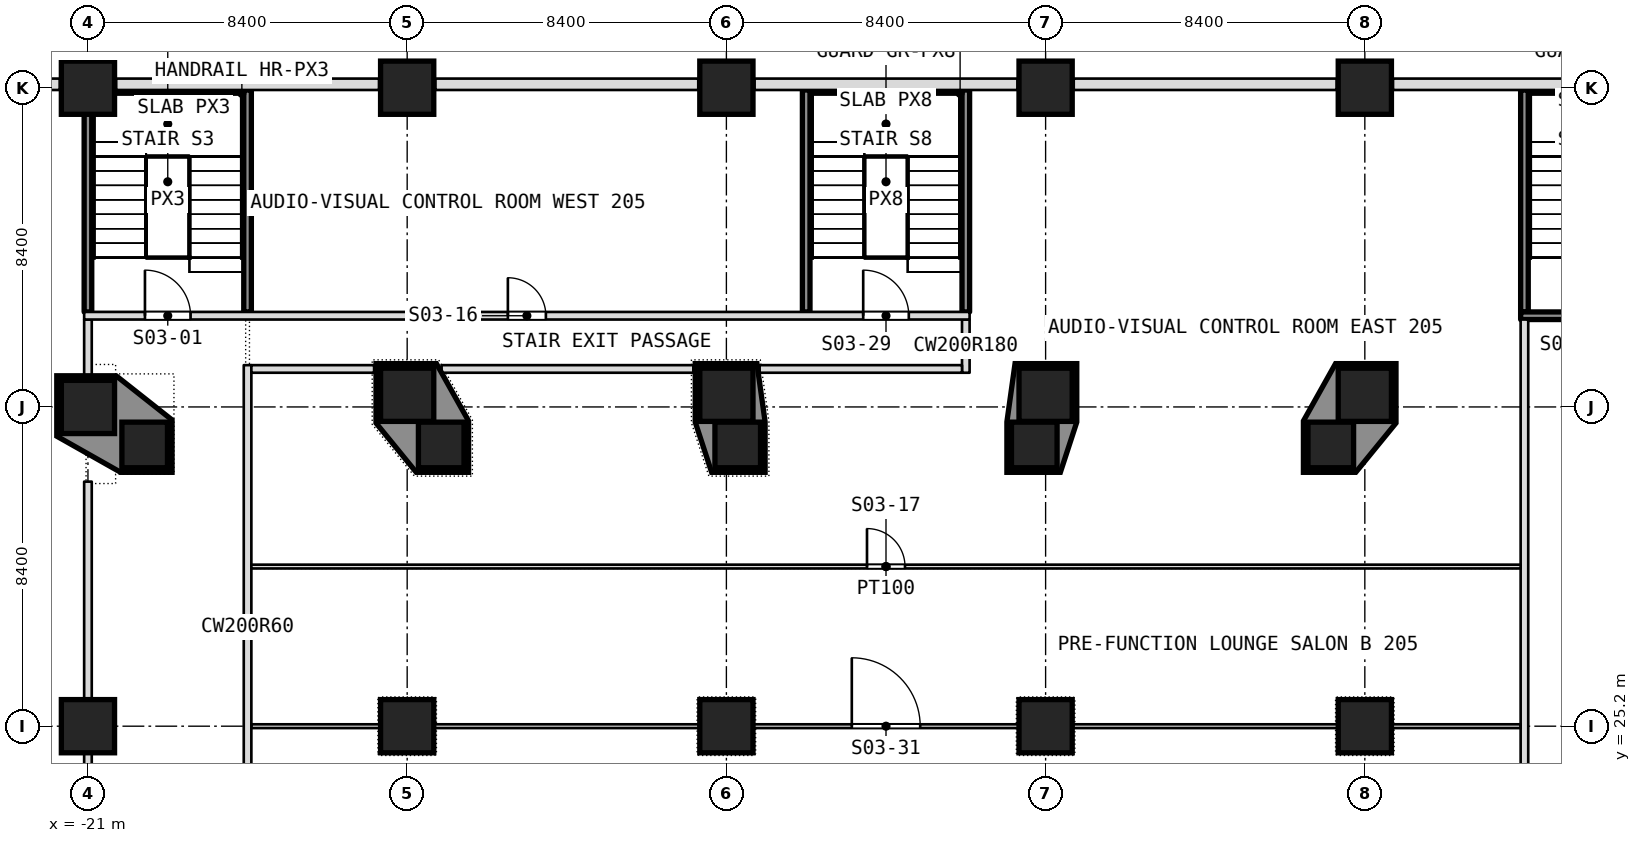
"""IFC4 building model, lengths in metres.
Left out: names, types, materials, properties, quantities, classifications, styles, units other than length and angle.
Written with IfcOpenShell. Run it as: python <this file> out.ifc"""

import sys

from ifc_helpers import new_model, si_unit, direction, frame, frame_2d, origin, origin_2d, place, context, subcontext, project, spatial, polyline, rectangle, outline, extrude, element, fill, save


model = new_model("IFC4")
c1 = context("Model", 3, precision=1e-05, world=origin(), true_north=direction((0.0, 1.0)))
c2 = subcontext(c1, "Body", "Model", "MODEL_VIEW")
j1 = project(units=[si_unit("LENGTHUNIT", "METRE"), si_unit("PLANEANGLEUNIT", "RADIAN")], contexts=[c1])
p1 = place(None, origin())
s1 = spatial("IfcSite", under=j1, at=p1, CompositionType="ELEMENT")
p2 = place(p1, origin())
s2 = spatial("IfcBuilding", under=s1, at=p2, CompositionType="ELEMENT")
p3 = place(p2, frame((0.0, 0.0, 13.0)))
s3 = spatial("IfcBuildingStorey", under=s2, at=p3, CompositionType="ELEMENT", Elevation=13.0)
for number, where, z_axis, x_axis in (
    (1, (-21.0, 25.2, 0.0), (0.0, 0.0, 1.0), (1.0, 0.0, 0.0)),
    (2, (-12.6, 25.2, 0.0), (0.0, 0.0, 1.0), (1.0, 0.0, 0.0)),
    (3, (-4.2, 25.2, 0.0), (0.0, 0.0, 1.0), (1.0, 0.0, 0.0)),
    (4, (4.2, 25.2, 0.0), (0.0, 0.0, 1.0), (1.0, 0.0, 0.0)),
    (5, (12.6, 25.2, 0.0), (0.0, 0.0, 1.0), (1.0, 0.0, 0.0)),
    (6, (-21.0, 33.6, 0.0), (0.0, 0.0, 1.0), (1.0, 0.0, 0.0)),
    (7, (-12.6, 33.92, 0.0), (0.0, 0.0, 1.0), (1.0, 0.0, 0.0)),
    (8, (-4.2, 33.92, 0.0), (0.0, 0.0, 1.0), (1.0, 0.0, 0.0)),
    (9, (4.2, 33.92, 0.0), (0.0, 0.0, 1.0), (1.0, 0.0, 0.0)),
    (10, (12.6, 33.92, 0.0), (0.0, 0.0, 1.0), (1.0, 0.0, 0.0)),
    (11, (-21.0, 42.0, 0.0), (0.0, 0.0, 1.0), (1.0, 0.0, 0.0)),
    (12, (-12.6, 42.0, 0.0), (0.0, 0.0, 1.0), (1.0, 0.0, 0.0)),
    (13, (-4.2, 42.0, 0.0), (0.0, 0.0, 1.0), (1.0, 0.0, 0.0)),
    (14, (4.2, 42.0, 0.0), (0.0, 0.0, 1.0), (1.0, 0.0, 0.0)),
    (15, (12.6, 42.0, 0.0), (0.0, 0.0, 1.0), (1.0, 0.0, 0.0)),
):
    element("IfcColumn", number, at=place(p3, frame(where, z_axis=z_axis, x_axis=x_axis)), inside=s3, PredefinedType="COLUMN", context=c2, shape_type="SweptSolid", body=[
        extrude(rectangle(XDim=1.4, YDim=1.4, at=origin_2d()), origin(), (0.0, 0.0, 1.0), 8.0),
    ])
for number, where, z_axis, x_axis in (
    (16, (-19.507, 32.6, 0.0), (0.0, 0.0, 1.0), (1.0, 0.0, 0.0)),
    (17, (-11.704, 32.6, 0.0), (0.0, 0.0, 1.0), (1.0, 0.0, 0.0)),
    (18, (-3.901, 32.6, 0.0), (0.0, 0.0, 1.0), (1.0, 0.0, 0.0)),
    (19, (3.901, 32.6, 0.0), (0.0, 0.0, 1.0), (1.0, 0.0, 0.0)),
    (20, (11.704, 32.6, 0.0), (0.0, 0.0, 1.0), (1.0, 0.0, 0.0)),
):
    element("IfcColumn", number, at=place(p3, frame(where, z_axis=z_axis, x_axis=x_axis)), inside=s3, PredefinedType="COLUMN", context=c2, shape_type="SweptSolid", body=[
        extrude(rectangle(XDim=1.2, YDim=1.2, at=origin_2d()), origin(), (0.0, 0.0, 1.0), 8.0),
    ])
p4 = place(p3, frame((16.8, 20.9, 0.0), z_axis=(0.0, 0.0, 1.0), x_axis=(0.0, 1.0, 0.0)))
e21 = element("IfcWall", 21, at=p4, inside=s3, PredefinedType="PARTITIONING", context=c2, shape_type="SweptSolid", body=[
    extrude(rectangle(XDim=15.0, YDim=0.2, at=frame_2d((7.5, 0.0))), origin(), (0.0, 0.0, 1.0), 7.68),
])
for number, where, z_axis, x_axis in (
    (22, (16.8, 36.1, 0.0), (0.0, 0.0, 1.0), (0.0, 1.0, 0.0)),
    (23, (2.1, 36.1, 0.0), (0.0, 0.0, 1.0), (0.0, 1.0, 0.0)),
):
    element("IfcWall", number, at=place(p3, frame(where, z_axis=z_axis, x_axis=x_axis)), inside=s3, PredefinedType="PARTITIONING", context=c2, shape_type="SweptSolid", body=[
        extrude(rectangle(XDim=5.84, YDim=0.2, at=frame_2d((2.92, 0.0))), origin(), (0.0, 0.0, 1.0), 7.68),
    ])
p5 = place(p3, frame((2.1, 34.5, 0.0), z_axis=(0.0, 0.0, 1.0), x_axis=(0.0, 1.0, 0.0)))
e24 = element("IfcWall", 24, at=p5, inside=s3, PredefinedType="PARTITIONING", context=c2, shape_type="SweptSolid", body=[
    extrude(rectangle(XDim=1.4, YDim=0.2, at=frame_2d((0.7, 0.0))), origin(), (0.0, 0.0, 1.0), 7.68),
])
p6 = place(p3, frame((-2.1, 36.1, 0.0), z_axis=(0.0, 0.0, 1.0), x_axis=(0.0, 1.0, 0.0)))
e25 = element("IfcWall", 25, at=p6, inside=s3, PredefinedType="PARTITIONING", context=c2, shape_type="SweptSolid", body=[
    extrude(rectangle(XDim=5.84, YDim=0.2, at=frame_2d((2.92, 0.0))), origin(), (0.0, 0.0, 1.0), 7.68),
])
p7 = place(p3, frame((-16.8, 20.9, 0.0), z_axis=(0.0, 0.0, 1.0), x_axis=(0.0, 1.0, 0.0)))
e26 = element("IfcWall", 26, at=p7, inside=s3, PredefinedType="PARTITIONING", context=c2, shape_type="SweptSolid", body=[
    extrude(rectangle(XDim=13.8, YDim=0.2, at=frame_2d((6.9, 0.0))), origin(), (0.0, 0.0, 1.0), 7.68),
])
p8 = place(p3, frame((-16.8, 36.1, 0.0), z_axis=(0.0, 0.0, 1.0), x_axis=(0.0, 1.0, 0.0)))
e27 = element("IfcWall", 27, at=p8, inside=s3, PredefinedType="PARTITIONING", context=c2, shape_type="SweptSolid", body=[
    extrude(rectangle(XDim=5.84, YDim=0.2, at=frame_2d((2.92, 0.0))), origin(), (0.0, 0.0, 1.0), 7.68),
])
p9 = place(p3, frame((-21.0, 9.5, 0.0), z_axis=(0.0, 0.0, 1.0), x_axis=(0.0, 1.0, 0.0)))
e28 = element("IfcWall", 28, at=p9, inside=s3, PredefinedType="PARTITIONING", context=c2, shape_type="SweptSolid", body=[
    extrude(rectangle(XDim=22.135, YDim=0.2, at=frame_2d((11.067, 0.0))), origin(), (0.0, 0.0, 1.0), 7.68),
])
p10 = place(p9, frame((8.318, 0.0, 0.0)))
e29 = element("IfcOpeningElement", 29, at=p10, cuts=e28, PredefinedType="OPENING", context=c2, shape_type="SweptSolid", body=[
    extrude(rectangle(XDim=1.8, YDim=2.1, at=frame_2d((0.9, 1.05))), frame((0.0, 0.1, 0.0), z_axis=(0.0, -1.0, 0.0), x_axis=(1.0, 0.0, 0.0)), (0.0, 0.0, 1.0), 0.2),
])
p11 = place(p3, frame((-21.0, 34.42, 0.0), z_axis=(0.0, 0.0, 1.0), x_axis=(0.0, 1.0, 0.0)))
e30 = element("IfcWall", 30, at=p11, inside=s3, PredefinedType="PARTITIONING", context=c2, shape_type="SweptSolid", body=[
    extrude(rectangle(XDim=1.48, YDim=0.2, at=frame_2d((0.74, 0.0))), origin(), (0.0, 0.0, 1.0), 7.68),
])
p12 = place(p3, frame((-21.0, 36.1, 0.0), z_axis=(0.0, 0.0, 1.0), x_axis=(0.0, 1.0, 0.0)))
e31 = element("IfcWall", 31, at=p12, inside=s3, PredefinedType="PARTITIONING", context=c2, shape_type="SweptSolid", body=[
    extrude(rectangle(XDim=6.2, YDim=0.2, at=frame_2d((3.1, 0.0))), origin(), (0.0, 0.0, 1.0), 7.68),
])
p13 = place(p3, frame((-16.7, 25.2, 0.0), z_axis=(0.0, 0.0, 1.0), x_axis=(1.0, 0.0, 0.0)))
e32 = element("IfcWall", 32, at=p13, inside=s3, PredefinedType="PARTITIONING", context=c2, shape_type="SweptSolid", body=[
    extrude(rectangle(XDim=3.38, YDim=0.1, at=frame_2d((1.69, 0.0))), origin(), (0.0, 0.0, 1.0), 7.68),
])
p14 = place(p3, frame((-11.88, 25.2, 0.0), z_axis=(0.0, 0.0, 1.0), x_axis=(1.0, 0.0, 0.0)))
e33 = element("IfcWall", 33, at=p14, inside=s3, PredefinedType="PARTITIONING", context=c2, shape_type="SweptSolid", body=[
    extrude(rectangle(XDim=6.96, YDim=0.1, at=frame_2d((3.48, 0.0))), origin(), (0.0, 0.0, 1.0), 7.68),
])
p15 = place(p3, frame((-3.48, 25.2, 0.0), z_axis=(0.0, 0.0, 1.0), x_axis=(1.0, 0.0, 0.0)))
e34 = element("IfcWall", 34, at=p15, inside=s3, PredefinedType="PARTITIONING", context=c2, shape_type="SweptSolid", body=[
    extrude(rectangle(XDim=6.96, YDim=0.1, at=frame_2d((3.48, 0.0))), origin(), (0.0, 0.0, 1.0), 7.68),
])
p16 = place(p15, frame((2.58, 0.0, 0.0)))
e35 = element("IfcOpeningElement", 35, at=p16, cuts=e34, PredefinedType="OPENING", context=c2, shape_type="SweptSolid", body=[
    extrude(rectangle(XDim=1.8, YDim=2.1, at=frame_2d((0.9, 1.05))), frame((0.0, 0.05, 0.0), z_axis=(0.0, -1.0, 0.0), x_axis=(1.0, 0.0, 0.0)), (0.0, 0.0, 1.0), 0.1),
])
p17 = place(p3, frame((4.92, 25.2, 0.0), z_axis=(0.0, 0.0, 1.0), x_axis=(1.0, 0.0, 0.0)))
e36 = element("IfcWall", 36, at=p17, inside=s3, PredefinedType="PARTITIONING", context=c2, shape_type="SweptSolid", body=[
    extrude(rectangle(XDim=6.96, YDim=0.1, at=frame_2d((3.48, 0.0))), origin(), (0.0, 0.0, 1.0), 7.68),
])
p18 = place(p3, frame((13.32, 25.2, 0.0), z_axis=(0.0, 0.0, 1.0), x_axis=(1.0, 0.0, 0.0)))
e37 = element("IfcWall", 37, at=p18, inside=s3, PredefinedType="PARTITIONING", context=c2, shape_type="SweptSolid", body=[
    extrude(rectangle(XDim=3.38, YDim=0.1, at=frame_2d((1.69, 0.0))), origin(), (0.0, 0.0, 1.0), 7.68),
])
p19 = place(p3, frame((-16.7, 29.4, 0.0), z_axis=(0.0, 0.0, 1.0), x_axis=(1.0, 0.0, 0.0)))
e38 = element("IfcWall", 38, at=p19, inside=s3, PredefinedType="PARTITIONING", context=c2, shape_type="SweptSolid", body=[
    extrude(rectangle(XDim=33.4, YDim=0.1, at=frame_2d((16.7, 0.0))), origin(), (0.0, 0.0, 1.0), 7.68),
])
p20 = place(p19, frame((16.2, 0.0, 0.0)))
e39 = element("IfcOpeningElement", 39, at=p20, cuts=e38, PredefinedType="OPENING", context=c2, shape_type="SweptSolid", body=[
    extrude(rectangle(XDim=1.0, YDim=2.1, at=frame_2d((0.5, 1.05))), frame((0.0, 0.05, 0.0), z_axis=(0.0, -1.0, 0.0), x_axis=(1.0, 0.0, 0.0)), (0.0, 0.0, 1.0), 0.1),
])
p21 = place(p3, frame((-16.7, 34.6, 0.0), z_axis=(0.0, 0.0, 1.0), x_axis=(1.0, 0.0, 0.0)))
e40 = element("IfcWall", 40, at=p21, inside=s3, PredefinedType="PARTITIONING", context=c2, shape_type="SweptSolid", body=[
    extrude(rectangle(XDim=3.23, YDim=0.2, at=frame_2d((1.615, 0.0))), origin(), (0.0, 0.0, 1.0), 7.68),
])
p22 = place(p3, frame((-11.694, 34.6, 0.0), z_axis=(0.0, 0.0, 1.0), x_axis=(1.0, 0.0, 0.0)))
e41 = element("IfcWall", 41, at=p22, inside=s3, PredefinedType="PARTITIONING", context=c2, shape_type="SweptSolid", body=[
    extrude(rectangle(XDim=6.624, YDim=0.2, at=frame_2d((3.312, 0.0))), origin(), (0.0, 0.0, 1.0), 7.68),
])
p23 = place(p3, frame((-3.326, 34.6, 0.0), z_axis=(0.0, 0.0, 1.0), x_axis=(1.0, 0.0, 0.0)))
e42 = element("IfcWall", 42, at=p23, inside=s3, PredefinedType="PARTITIONING", context=c2, shape_type="SweptSolid", body=[
    extrude(rectangle(XDim=5.326, YDim=0.2, at=frame_2d((2.663, 0.0))), origin(), (0.0, 0.0, 1.0), 7.68),
])
p24 = place(p3, frame((-21.1, 36.0, 0.0), z_axis=(0.0, 0.0, 1.0), x_axis=(1.0, 0.0, 0.0)))
e43 = element("IfcWall", 43, at=p24, inside=s3, PredefinedType="PARTITIONING", context=c2, shape_type="SweptSolid", body=[
    extrude(rectangle(XDim=23.3, YDim=0.2, at=frame_2d((11.65, 0.0))), origin(), (0.0, 0.0, 1.0), 7.68),
])
p25 = place(p24, frame((1.6, 0.0, 0.0)))
e44 = element("IfcOpeningElement", 44, at=p25, cuts=e43, PredefinedType="OPENING", context=c2, shape_type="SweptSolid", body=[
    extrude(rectangle(XDim=1.2, YDim=2.1, at=frame_2d((0.6, 1.05))), frame((0.0, 0.1, 0.0), z_axis=(0.0, -1.0, 0.0), x_axis=(1.0, 0.0, 0.0)), (0.0, 0.0, 1.0), 0.2),
])
p26 = place(p24, frame((11.15, 0.0, 0.0)))
e45 = element("IfcOpeningElement", 45, at=p26, cuts=e43, PredefinedType="OPENING", context=c2, shape_type="SweptSolid", body=[
    extrude(rectangle(XDim=1.0, YDim=2.1, at=frame_2d((0.5, 1.05))), frame((0.0, 0.1, 0.0), z_axis=(0.0, -1.0, 0.0), x_axis=(1.0, 0.0, 0.0)), (0.0, 0.0, 1.0), 0.2),
])
p27 = place(p24, frame((20.5, 0.0, 0.0)))
e46 = element("IfcOpeningElement", 46, at=p27, cuts=e43, PredefinedType="OPENING", context=c2, shape_type="SweptSolid", body=[
    extrude(rectangle(XDim=1.2, YDim=2.1, at=frame_2d((0.6, 1.05))), frame((0.0, 0.1, 0.0), z_axis=(0.0, -1.0, 0.0), x_axis=(1.0, 0.0, 0.0)), (0.0, 0.0, 1.0), 0.2),
])
p28 = place(p3, frame((16.7, 36.0, 0.0), z_axis=(0.0, 0.0, 1.0), x_axis=(1.0, 0.0, 0.0)))
e47 = element("IfcWall", 47, at=p28, inside=s3, PredefinedType="PARTITIONING", context=c2, shape_type="SweptSolid", body=[
    extrude(rectangle(XDim=4.4, YDim=0.2, at=frame_2d((2.2, 0.0))), origin(), (0.0, 0.0, 1.0), 7.68),
])
p29 = place(p28, frame((1.6, 0.0, 0.0)))
e48 = element("IfcOpeningElement", 48, at=p29, cuts=e47, PredefinedType="OPENING", context=c2, shape_type="SweptSolid", body=[
    extrude(rectangle(XDim=1.2, YDim=2.1, at=frame_2d((0.6, 1.05))), frame((0.0, 0.1, 0.0), z_axis=(0.0, -1.0, 0.0), x_axis=(1.0, 0.0, 0.0)), (0.0, 0.0, 1.0), 0.2),
])
p30 = place(p3, frame((20.26, 42.09, 0.0), z_axis=(0.0, 0.0, 1.0), x_axis=(-1.0, 0.0, 0.0)))
e49 = element("IfcWall", 49, at=p30, inside=s3, PredefinedType="NOTDEFINED", context=c2, shape_type="SweptSolid", body=[
    extrude(rectangle(XDim=6.92, YDim=0.3, at=frame_2d((3.46, 0.0))), origin(), (0.0, 0.0, 1.0), 6.78),
])
p31 = place(p3, frame((11.86, 42.09, 0.0), z_axis=(0.0, 0.0, 1.0), x_axis=(-1.0, 0.0, 0.0)))
e50 = element("IfcWall", 50, at=p31, inside=s3, PredefinedType="NOTDEFINED", context=c2, shape_type="SweptSolid", body=[
    extrude(rectangle(XDim=6.92, YDim=0.3, at=frame_2d((3.46, 0.0))), origin(), (0.0, 0.0, 1.0), 6.78),
])
p32 = place(p3, frame((3.46, 42.09, 0.0), z_axis=(0.0, 0.0, 1.0), x_axis=(-1.0, 0.0, 0.0)))
e51 = element("IfcWall", 51, at=p32, inside=s3, PredefinedType="NOTDEFINED", context=c2, shape_type="SweptSolid", body=[
    extrude(rectangle(XDim=6.92, YDim=0.3, at=frame_2d((3.46, 0.0))), origin(), (0.0, 0.0, 1.0), 6.78),
])
p33 = place(p3, frame((-4.94, 42.09, 0.0), z_axis=(0.0, 0.0, 1.0), x_axis=(-1.0, 0.0, 0.0)))
e52 = element("IfcWall", 52, at=p33, inside=s3, PredefinedType="NOTDEFINED", context=c2, shape_type="SweptSolid", body=[
    extrude(rectangle(XDim=6.92, YDim=0.3, at=frame_2d((3.46, 0.0))), origin(), (0.0, 0.0, 1.0), 6.78),
])
for number, where, z_axis, x_axis in (
    (53, (-13.34, 42.09, 0.0), (0.0, 0.0, 1.0), (-1.0, 0.0, 0.0)),
    (54, (-21.74, 42.09, 0.0), (0.0, 0.0, 1.0), (-1.0, 0.0, 0.0)),
):
    element("IfcWall", number, at=place(p3, frame(where, z_axis=z_axis, x_axis=x_axis)), inside=s3, PredefinedType="NOTDEFINED", context=c2, shape_type="SweptSolid", body=[
        extrude(rectangle(XDim=6.92, YDim=0.3, at=frame_2d((3.46, 0.0))), origin(), (0.0, 0.0, 1.0), 6.78),
    ])
p34 = place(p3, origin())
e55 = element("IfcWall", 55, at=p34, inside=s3, PredefinedType="SOLIDWALL", context=c2, shape_type="SweptSolid", body=[
    extrude(outline(polyline([(-21.82, 34.42), (-20.258, 34.42), (-18.787, 33.258), (-18.787, 31.88), (-20.138, 31.88), (-21.82, 32.83), (-21.82, 34.42)]), holes=[polyline([(-18.907, 32.0), (-18.907, 33.2), (-20.107, 33.2), (-20.107, 32.0), (-18.907, 32.0)]), polyline([(-20.3, 32.9), (-20.3, 34.3), (-21.7, 34.3), (-21.7, 32.9), (-20.3, 32.9)])]), origin(), (0.0, 0.0, 1.0), 8.0),
])
p35 = place(p3, origin())
e56 = element("IfcWall", 56, at=p35, inside=s3, PredefinedType="SOLIDWALL", context=c2, shape_type="SweptSolid", body=[
    extrude(outline(polyline([(-13.42, 33.177), (-13.42, 34.74), (-11.83, 34.74), (-10.984, 33.231), (-10.984, 31.88), (-12.361, 31.88), (-13.42, 33.177)]), holes=[polyline([(-12.304, 32.0), (-11.104, 32.0), (-11.104, 33.2), (-12.304, 33.2), (-12.304, 32.0)]), polyline([(-13.3, 33.22), (-11.9, 33.22), (-11.9, 34.62), (-13.3, 34.62), (-13.3, 33.22)])]), origin(), (0.0, 0.0, 1.0), 8.0),
])
p36 = place(p3, origin())
e57 = element("IfcWall", 57, at=p36, inside=s3, PredefinedType="SOLIDWALL", context=c2, shape_type="SweptSolid", body=[
    extrude(outline(polyline([(-5.02, 33.201), (-5.02, 34.74), (-3.396, 34.74), (-3.181, 33.208), (-3.181, 31.88), (-4.588, 31.88), (-5.02, 33.201)]), holes=[polyline([(-4.501, 32.0), (-3.302, 32.0), (-3.302, 33.2), (-4.501, 33.2), (-4.501, 32.0)]), polyline([(-4.9, 33.22), (-3.5, 33.22), (-3.5, 34.62), (-4.9, 34.62), (-4.9, 33.22)])]), origin(), (0.0, 0.0, 1.0), 8.0),
])
p37 = place(p3, origin())
e58 = element("IfcWall", 58, at=p37, inside=s3, PredefinedType="SOLIDWALL", context=c2, shape_type="SweptSolid", body=[
    extrude(outline(polyline([(3.181, 33.208), (3.396, 34.74), (5.02, 34.74), (5.02, 33.201), (4.588, 31.88), (3.181, 31.88), (3.181, 33.208)]), holes=[polyline([(3.5, 33.22), (4.9, 33.22), (4.9, 34.62), (3.5, 34.62), (3.5, 33.22)]), polyline([(3.302, 32.0), (4.501, 32.0), (4.501, 33.2), (3.302, 33.2), (3.302, 32.0)])]), origin(), (0.0, 0.0, 1.0), 8.0),
])
p38 = place(p3, origin())
e59 = element("IfcWall", 59, at=p38, inside=s3, PredefinedType="SOLIDWALL", context=c2, shape_type="SweptSolid", body=[
    extrude(outline(polyline([(10.984, 33.231), (11.83, 34.74), (13.42, 34.74), (13.42, 33.177), (12.361, 31.88), (10.984, 31.88), (10.984, 33.231)]), holes=[polyline([(11.9, 33.22), (13.3, 33.22), (13.3, 34.62), (11.9, 34.62), (11.9, 33.22)]), polyline([(11.104, 32.0), (12.304, 32.0), (12.304, 33.2), (11.104, 33.2), (11.104, 32.0)])]), origin(), (0.0, 0.0, 1.0), 8.0),
])
p39 = place(p25, origin())
e60 = element("IfcDoor", 60, at=p39, inside=s3, OperationType="SINGLE_SWING_RIGHT", PredefinedType="DOOR", context=c2, shape_type="SweptSolid", body=[
    extrude(rectangle(XDim=1.2, YDim=2.1, at=frame_2d((0.6, 1.05))), frame((0.0, 0.025, 0.0), z_axis=(0.0, -1.0, 0.0), x_axis=(1.0, 0.0, 0.0)), (0.0, 0.0, 1.0), 0.05),
])
fill(e44, e60)
p40 = place(p26, origin())
e61 = element("IfcDoor", 61, at=p40, inside=s3, OperationType="SINGLE_SWING_LEFT", PredefinedType="DOOR", context=c2, shape_type="SweptSolid", body=[
    extrude(rectangle(XDim=1.0, YDim=2.1, at=frame_2d((0.5, 1.05))), frame((0.0, 0.025, 0.0), z_axis=(0.0, -1.0, 0.0), x_axis=(1.0, 0.0, 0.0)), (0.0, 0.0, 1.0), 0.05),
])
fill(e45, e61)
p41 = place(p20, origin())
e62 = element("IfcDoor", 62, at=p41, inside=s3, OperationType="SINGLE_SWING_RIGHT", PredefinedType="DOOR", context=c2, shape_type="SweptSolid", body=[
    extrude(rectangle(XDim=1.0, YDim=2.1, at=frame_2d((0.5, 1.05))), frame((0.0, 0.025, 0.0), z_axis=(0.0, -1.0, 0.0), x_axis=(1.0, 0.0, 0.0)), (0.0, 0.0, 1.0), 0.05),
])
fill(e39, e62)
p42 = place(p27, origin())
e63 = element("IfcDoor", 63, at=p42, inside=s3, OperationType="SINGLE_SWING_LEFT", PredefinedType="DOOR", context=c2, shape_type="SweptSolid", body=[
    extrude(rectangle(XDim=1.2, YDim=2.1, at=frame_2d((0.6, 1.05))), frame((0.0, 0.025, 0.0), z_axis=(0.0, -1.0, 0.0), x_axis=(1.0, 0.0, 0.0)), (0.0, 0.0, 1.0), 0.05),
])
fill(e46, e63)
p43 = place(p16, origin())
e64 = element("IfcDoor", 64, at=p43, inside=s3, OperationType="DOUBLE_DOOR_SINGLE_SWING", PredefinedType="DOOR", context=c2, shape_type="SweptSolid", body=[
    extrude(rectangle(XDim=1.8, YDim=2.1, at=frame_2d((0.9, 1.05))), frame((0.0, 0.025, 0.0), z_axis=(0.0, -1.0, 0.0), x_axis=(1.0, 0.0, 0.0)), (0.0, 0.0, 1.0), 0.05),
])
fill(e35, e64)
save(model, sys.argv[1])
